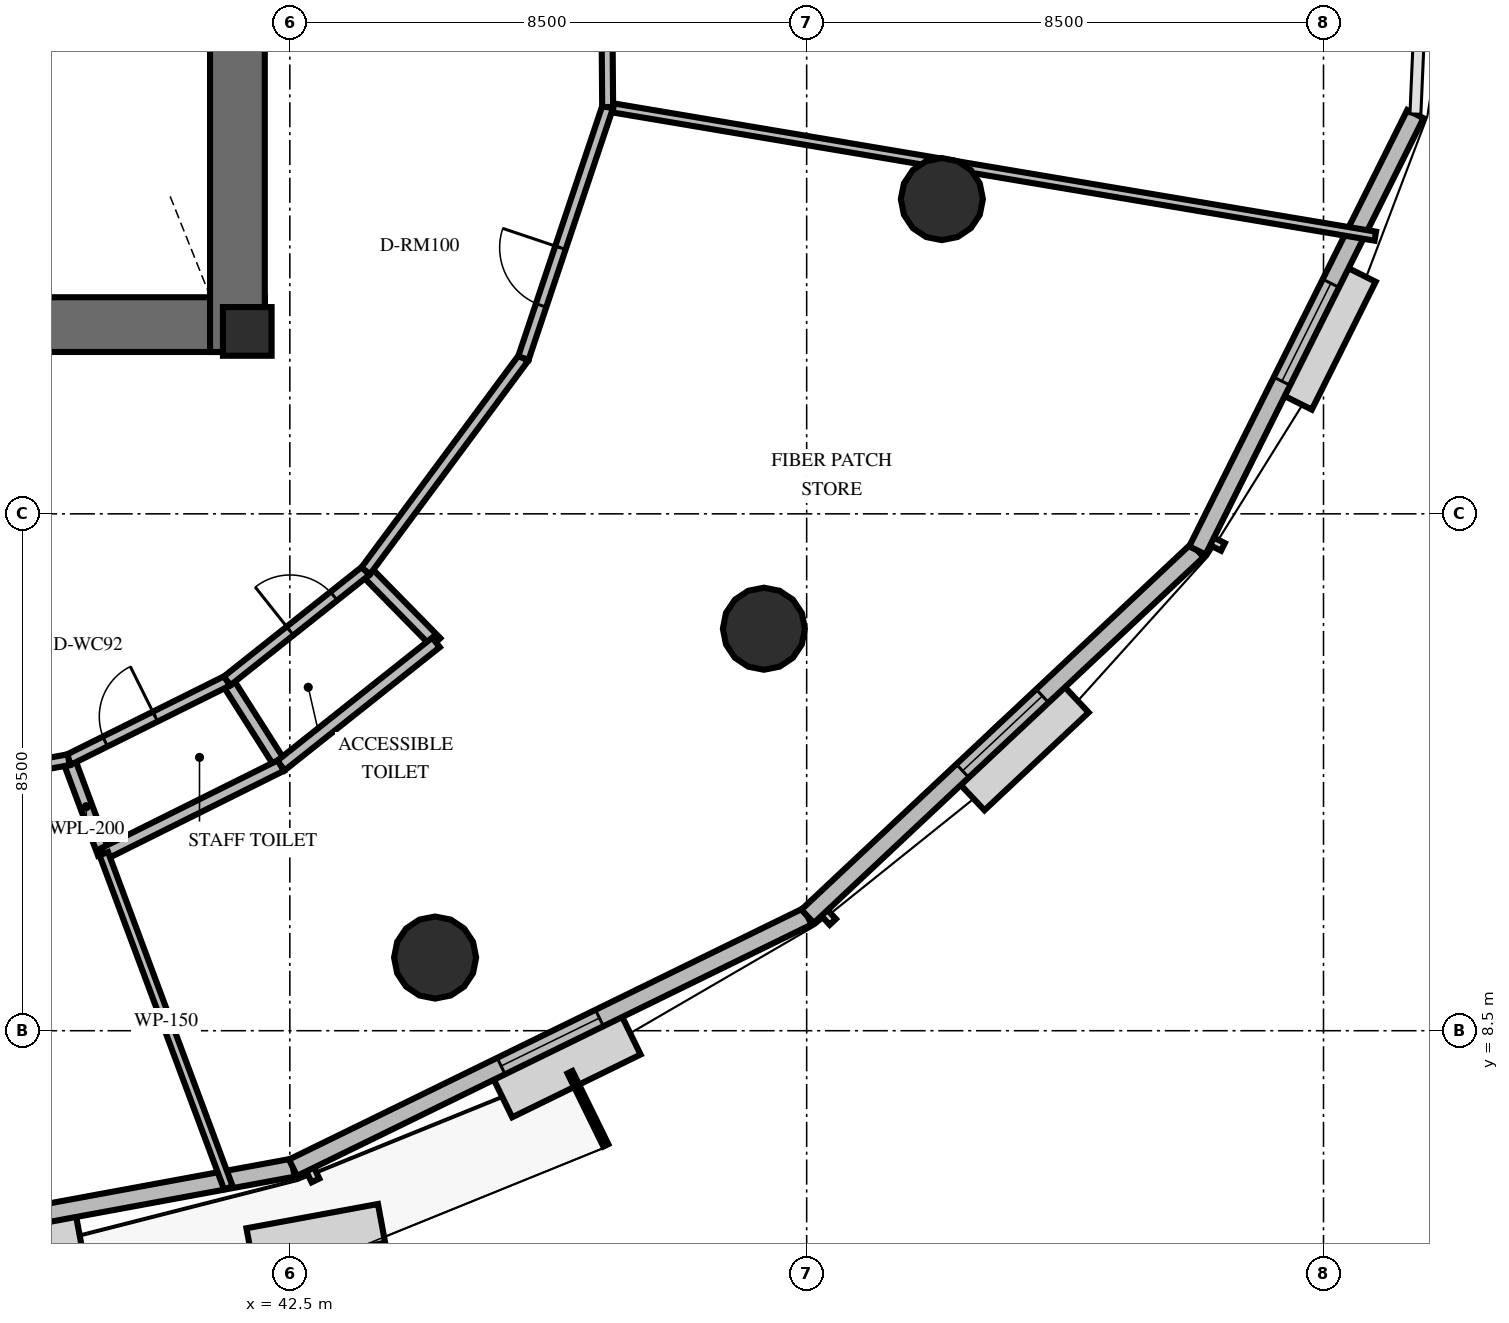
"""IFC4 building model, lengths in metres.
Left out: names, types, materials, properties, quantities, classifications, styles, units other than length and angle.
Written with IfcOpenShell. Run it as: python <this file> out.ifc"""

import sys

from ifc_helpers import new_model, si_unit, direction, frame, frame_2d, origin, origin_2d, place, context, subcontext, project, spatial, rectangle, circle, extrude, element, fill, save


model = new_model("IFC4")
c1 = context("Model", 3, precision=1e-05, world=origin(), true_north=direction((0.0, 1.0)))
c2 = subcontext(c1, "Body", "Model", "MODEL_VIEW")
j1 = project(units=[si_unit("LENGTHUNIT", "METRE"), si_unit("PLANEANGLEUNIT", "RADIAN")], contexts=[c1])
p1 = place(None, origin())
s1 = spatial("IfcSite", under=j1, at=p1, CompositionType="ELEMENT")
p2 = place(p1, origin())
s2 = spatial("IfcBuilding", under=s1, at=p2, CompositionType="ELEMENT")
p3 = place(p2, frame((0.0, 0.0, 76.2)))
s3 = spatial("IfcBuildingStorey", under=s2, at=p3, CompositionType="ELEMENT", Elevation=76.2)
p4 = place(p3, frame((25.922, 20.112, 0.0), z_axis=(0.0, 0.0, 1.0), x_axis=(1.0, 0.0, 0.0)))
e1 = element("IfcWall", 1, at=p4, inside=s3, PredefinedType="SHEAR", context=c2, shape_type="SweptSolid", body=[
    extrude(rectangle(XDim=16.166, YDim=0.9, at=frame_2d((8.083, 0.0))), origin(), (0.0, 0.0, 1.0), 4.2),
])
p5 = place(p3, frame((41.638, 19.662, 0.0), z_axis=(0.0, 0.0, 1.0), x_axis=(0.0, 1.0, 0.0)))
e2 = element("IfcWall", 2, at=p5, inside=s3, PredefinedType="SHEAR", context=c2, shape_type="SweptSolid", body=[
    extrude(rectangle(XDim=10.876, YDim=0.9, at=frame_2d((5.438, 0.0))), origin(), (0.0, 0.0, 1.0), 4.2),
])
p6 = place(p3, frame((41.8, 20.0, 0.0), z_axis=(0.0, 0.0, 1.0), x_axis=(1.0, 0.0, 0.0)))
e3 = element("IfcColumn", 3, at=p6, inside=s3, PredefinedType="PILASTER", context=c2, shape_type="SweptSolid", body=[
    extrude(rectangle(XDim=0.8, YDim=0.8, at=origin_2d()), origin(), (0.0, 0.0, 1.0), 4.2),
])
for number, where, z_axis, x_axis in (
    (4, (44.889, 9.703, 0.0), (0.0, 0.0, 1.0), (1.0, 0.0, 0.0)),
    (5, (50.297, 15.111, 0.0), (0.0, 0.0, 1.0), (1.0, 0.0, 0.0)),
    (6, (53.223, 22.176, 0.0), (0.0, 0.0, 1.0), (1.0, 0.0, 0.0)),
):
    element("IfcColumn", number, at=place(p3, frame(where, z_axis=z_axis, x_axis=x_axis)), inside=s3, PredefinedType="COLUMN", context=c2, shape_type="SweptSolid", body=[
        extrude(circle(Radius=0.675, at=origin_2d()), origin(), (0.0, 0.0, 1.0), 4.2),
    ])
p7 = place(p3, frame((33.057, 4.496, 0.0), z_axis=(0.0, 0.0, 1.0), x_axis=(0.983412379237, 0.18138382608, 0.0)))
e7 = element("IfcWall", 7, at=p7, inside=s3, PredefinedType="SOLIDWALL", context=c2, shape_type="SweptSolid", body=[
    extrude(rectangle(XDim=9.655, YDim=0.3, at=frame_2d((4.827, 0.0))), origin(), (0.0, 0.0, 1.0), 3.0),
])
p8 = place(p7, frame((0.43, 0.0, 0.0)))
e8 = element("IfcOpeningElement", 8, at=p8, cuts=e7, PredefinedType="OPENING", context=c2, shape_type="SweptSolid", body=[
    extrude(rectangle(XDim=1.05, YDim=2.15, at=frame_2d((0.525, 1.075))), frame((0.0, 0.16, 0.0), z_axis=(0.0, -1.0, 0.0), x_axis=(1.0, 0.0, 0.0)), (0.0, 0.0, 1.0), 0.32),
])
p9 = place(p3, frame((42.552, 6.247, 0.0), z_axis=(0.0, 0.0, 1.0), x_axis=(0.898541129578, 0.438889323699, 0.0)))
e9 = element("IfcWall", 9, at=p9, inside=s3, PredefinedType="SOLIDWALL", context=c2, shape_type="SweptSolid", body=[
    extrude(rectangle(XDim=9.419, YDim=0.3, at=frame_2d((4.709, 0.0))), origin(), (0.0, 0.0, 1.0), 3.0),
])
p10 = place(p9, frame((3.809, 0.0, 0.8)))
e10 = element("IfcOpeningElement", 10, at=p10, cuts=e9, PredefinedType="OPENING", context=c2, shape_type="SweptSolid", body=[
    extrude(rectangle(XDim=1.8, YDim=1.95, at=frame_2d((0.9, 0.975))), frame((0.0, 0.16, 0.0), z_axis=(0.0, -1.0, 0.0), x_axis=(1.0, 0.0, 0.0)), (0.0, 0.0, 1.0), 0.32),
])
p11 = place(p3, frame((51.015, 10.381, 0.0), z_axis=(0.0, 0.0, 1.0), x_axis=(0.729132694963, 0.684372349775, 0.0)))
e11 = element("IfcWall", 11, at=p11, inside=s3, PredefinedType="SOLIDWALL", context=c2, shape_type="SweptSolid", body=[
    extrude(rectangle(XDim=8.792, YDim=0.3, at=frame_2d((4.396, 0.0))), origin(), (0.0, 0.0, 1.0), 3.0),
])
p12 = place(p11, frame((3.496, 0.0, 0.8)))
e12 = element("IfcOpeningElement", 12, at=p12, cuts=e11, PredefinedType="OPENING", context=c2, shape_type="SweptSolid", body=[
    extrude(rectangle(XDim=1.8, YDim=1.95, at=frame_2d((0.9, 0.975))), frame((0.0, 0.16, 0.0), z_axis=(0.0, -1.0, 0.0), x_axis=(1.0, 0.0, 0.0)), (0.0, 0.0, 1.0), 0.32),
])
p13 = place(p3, frame((57.426, 16.398, 0.0), z_axis=(0.0, 0.0, 1.0), x_axis=(0.44697009801, 0.894548898319, 0.0)))
e13 = element("IfcWall", 13, at=p13, inside=s3, PredefinedType="SOLIDWALL", context=c2, shape_type="SweptSolid", body=[
    extrude(rectangle(XDim=8.022, YDim=0.3, at=frame_2d((4.011, 0.0))), origin(), (0.0, 0.0, 1.0), 3.0),
])
p14 = place(p13, frame((3.111, 0.0, 0.8)))
e14 = element("IfcOpeningElement", 14, at=p14, cuts=e13, PredefinedType="OPENING", context=c2, shape_type="SweptSolid", body=[
    extrude(rectangle(XDim=1.8, YDim=1.95, at=frame_2d((0.9, 0.975))), frame((0.0, 0.16, 0.0), z_axis=(0.0, -1.0, 0.0), x_axis=(1.0, 0.0, 0.0)), (0.0, 0.0, 1.0), 0.32),
])
for number, where, z_axis, x_axis in (
    (15, (38.864, 12.957, 0.0), (0.0, 0.0, 1.0), (0.349, -0.937, 0.0)),
    (16, (41.469, 14.253, 0.0), (0.0, 0.0, 1.0), (0.537, -0.844, 0.0)),
):
    element("IfcWall", number, at=place(p3, frame(where, z_axis=z_axis, x_axis=x_axis)), inside=s3, PredefinedType="PLUMBINGWALL", context=c2, shape_type="SweptSolid", body=[
        extrude(rectangle(XDim=1.65, YDim=0.2, at=frame_2d((0.825, 0.0))), origin(), (0.0, 0.0, 1.0), 3.0),
    ])
p15 = place(p3, frame((39.44, 11.411, 0.0), z_axis=(0.0, 0.0, 1.0), x_axis=(0.895340385459, 0.445382525664, 0.0)))
e17 = element("IfcWall", 17, at=p15, inside=s3, PredefinedType="PLUMBINGWALL", context=c2, shape_type="SweptSolid", body=[
    extrude(rectangle(XDim=3.255, YDim=0.2, at=frame_2d((1.627, 0.0))), origin(), (0.0, 0.0, 1.0), 3.0),
])
p16 = place(p3, frame((38.864, 12.957, 0.0), z_axis=(0.0, 0.0, 1.0), x_axis=(0.895331425302, 0.445400537568, 0.0)))
e18 = element("IfcWall", 18, at=p16, inside=s3, PredefinedType="PARTITIONING", context=c2, shape_type="SweptSolid", body=[
    extrude(rectangle(XDim=2.91, YDim=0.18, at=frame_2d((1.455, 0.0))), origin(), (0.0, 0.0, 1.0), 3.0),
])
p17 = place(p16, frame((0.669, 0.0, 0.0)))
e19 = element("IfcOpeningElement", 19, at=p17, cuts=e18, PredefinedType="OPENING", context=c2, shape_type="SweptSolid", body=[
    extrude(rectangle(XDim=0.92, YDim=2.1, at=frame_2d((0.46, 1.05))), frame((0.0, 0.1, 0.0), z_axis=(0.0, -1.0, 0.0), x_axis=(1.0, 0.0, 0.0)), (0.0, 0.0, 1.0), 0.2),
])
p18 = place(p3, frame((43.748, 16.063, 0.0), z_axis=(0.0, 0.0, 1.0), x_axis=(0.700342092657, -0.713807364246, 0.0)))
e20 = element("IfcWall", 20, at=p18, inside=s3, PredefinedType="PLUMBINGWALL", context=c2, shape_type="SweptSolid", body=[
    extrude(rectangle(XDim=1.65, YDim=0.2, at=frame_2d((0.825, 0.0))), origin(), (0.0, 0.0, 1.0), 3.0),
])
p19 = place(p3, frame((42.354, 12.861, 0.0), z_axis=(0.0, 0.0, 1.0), x_axis=(0.78315381666, 0.621828030447, 0.0)))
e21 = element("IfcWall", 21, at=p19, inside=s3, PredefinedType="PLUMBINGWALL", context=c2, shape_type="SweptSolid", body=[
    extrude(rectangle(XDim=3.255, YDim=0.2, at=frame_2d((1.627, 0.0))), origin(), (0.0, 0.0, 1.0), 3.0),
])
p20 = place(p3, frame((41.469, 14.253, 0.0), z_axis=(0.0, 0.0, 1.0), x_axis=(0.783155307365, 0.621826152993, 0.0)))
e22 = element("IfcWall", 22, at=p20, inside=s3, PredefinedType="PARTITIONING", context=c2, shape_type="SweptSolid", body=[
    extrude(rectangle(XDim=2.91, YDim=0.18, at=frame_2d((1.455, 0.0))), origin(), (0.0, 0.0, 1.0), 3.0),
])
p21 = place(p20, frame((1.321, 0.0, 0.0)))
e23 = element("IfcOpeningElement", 23, at=p21, cuts=e22, PredefinedType="OPENING", context=c2, shape_type="SweptSolid", body=[
    extrude(rectangle(XDim=0.92, YDim=2.1, at=frame_2d((0.46, 1.05))), frame((0.0, 0.1, 0.0), z_axis=(0.0, -1.0, 0.0), x_axis=(1.0, 0.0, 0.0)), (0.0, 0.0, 1.0), 0.2),
])
p22 = place(p3, frame((39.44, 11.411, 0.0), z_axis=(0.0, 0.0, 1.0), x_axis=(0.349393600654, -0.936976046557, 0.0)))
e24 = element("IfcWall", 24, at=p22, inside=s3, PredefinedType="PARTITIONING", context=c2, shape_type="SweptSolid", body=[
    extrude(rectangle(XDim=5.864, YDim=0.15, at=frame_2d((2.932, 0.0))), origin(), (0.0, 0.0, 1.0), 3.0),
])
p23 = place(p3, frame((47.727, 23.691, 0.0), z_axis=(0.0, 0.0, 1.0), x_axis=(0.986140728359, -0.165911011907, 0.0)))
e25 = element("IfcWall", 25, at=p23, inside=s3, PredefinedType="PARTITIONING", context=c2, shape_type="SweptSolid", body=[
    extrude(rectangle(XDim=12.802, YDim=0.15, at=frame_2d((6.401, 0.0))), origin(), (0.0, 0.0, 1.0), 3.0),
])
p24 = place(p3, frame((43.748, 16.063, 0.0), z_axis=(0.0, 0.0, 1.0), x_axis=(0.595496979613, 0.803357546346, 0.0)))
e26 = element("IfcWall", 26, at=p24, inside=s3, PredefinedType="PARTITIONING", context=c2, shape_type="SweptSolid", body=[
    extrude(rectangle(XDim=4.355, YDim=0.18, at=frame_2d((2.178, 0.0))), origin(), (0.0, 0.0, 1.0), 3.0),
])
p25 = place(p3, frame((46.342, 19.562, 0.0), z_axis=(0.0, 0.0, 1.0), x_axis=(0.318127487837, 0.948047942608, 0.0)))
e27 = element("IfcWall", 27, at=p25, inside=s3, PredefinedType="PARTITIONING", context=c2, shape_type="SweptSolid", body=[
    extrude(rectangle(XDim=4.355, YDim=0.18, at=frame_2d((2.178, 0.0))), origin(), (0.0, 0.0, 1.0), 3.0),
])
p26 = place(p25, frame((0.914, 0.0, 0.0)))
e28 = element("IfcOpeningElement", 28, at=p26, cuts=e27, PredefinedType="OPENING", context=c2, shape_type="SweptSolid", body=[
    extrude(rectangle(XDim=1.0, YDim=2.15, at=frame_2d((0.5, 1.075))), frame((0.0, 0.1, 0.0), z_axis=(0.0, -1.0, 0.0), x_axis=(1.0, 0.0, 0.0)), (0.0, 0.0, 1.0), 0.2),
])
p27 = place(p3, frame((47.727, 23.691, 0.0), z_axis=(0.0, 0.0, 1.0), x_axis=(-0.007827647661, 0.999969363497, 0.0)))
e29 = element("IfcWall", 29, at=p27, inside=s3, PredefinedType="PARTITIONING", context=c2, shape_type="SweptSolid", body=[
    extrude(rectangle(XDim=4.834, YDim=0.18, at=frame_2d((2.417, 0.0))), origin(), (0.0, 0.0, 1.0), 3.0),
])
p28 = place(p27, frame((1.842, 0.0, 0.0)))
e30 = element("IfcOpeningElement", 30, at=p28, cuts=e29, PredefinedType="OPENING", context=c2, shape_type="SweptSolid", body=[
    extrude(rectangle(XDim=1.15, YDim=2.15, at=frame_2d((0.575, 1.075))), frame((0.0, 0.1, 0.0), z_axis=(0.0, -1.0, 0.0), x_axis=(1.0, 0.0, 0.0)), (0.0, 0.0, 1.0), 0.2),
])
p29 = place(p3, frame((34.109, 12.08, 0.0), z_axis=(0.0, 0.0, 1.0), x_axis=(0.983409356077, 0.181400216044, 0.0)))
e31 = element("IfcWall", 31, at=p29, inside=s3, PredefinedType="PARTITIONING", context=c2, shape_type="SweptSolid", body=[
    extrude(rectangle(XDim=4.834, YDim=0.18, at=frame_2d((2.417, 0.0))), origin(), (0.0, 0.0, 1.0), 3.0),
])
p30 = place(p10, origin())
e32 = element("IfcWindow", 32, at=p30, inside=s3, PartitioningType="SINGLE_PANEL", PredefinedType="WINDOW", context=c2, shape_type="SweptSolid", body=[
    extrude(rectangle(XDim=1.8, YDim=1.95, at=frame_2d((0.9, 0.975))), frame((0.0, 0.03, 0.0), z_axis=(0.0, -1.0, 0.0), x_axis=(1.0, 0.0, 0.0)), (0.0, 0.0, 1.0), 0.06),
])
fill(e10, e32)
p31 = place(p12, origin())
e33 = element("IfcWindow", 33, at=p31, inside=s3, PartitioningType="SINGLE_PANEL", PredefinedType="WINDOW", context=c2, shape_type="SweptSolid", body=[
    extrude(rectangle(XDim=1.8, YDim=1.95, at=frame_2d((0.9, 0.975))), frame((0.0, 0.03, 0.0), z_axis=(0.0, -1.0, 0.0), x_axis=(1.0, 0.0, 0.0)), (0.0, 0.0, 1.0), 0.06),
])
fill(e12, e33)
p32 = place(p14, origin())
e34 = element("IfcWindow", 34, at=p32, inside=s3, PartitioningType="SINGLE_PANEL", PredefinedType="WINDOW", context=c2, shape_type="SweptSolid", body=[
    extrude(rectangle(XDim=1.8, YDim=1.95, at=frame_2d((0.9, 0.975))), frame((0.0, 0.03, 0.0), z_axis=(0.0, -1.0, 0.0), x_axis=(1.0, 0.0, 0.0)), (0.0, 0.0, 1.0), 0.06),
])
fill(e14, e34)
p33 = place(p17, origin())
e35 = element("IfcDoor", 35, at=p33, inside=s3, OperationType="SINGLE_SWING_RIGHT", PredefinedType="DOOR", context=c2, shape_type="SweptSolid", body=[
    extrude(rectangle(XDim=0.92, YDim=2.1, at=frame_2d((0.46, 1.05))), frame((0.0, 0.025, 0.0), z_axis=(0.0, -1.0, 0.0), x_axis=(1.0, 0.0, 0.0)), (0.0, 0.0, 1.0), 0.05),
])
fill(e19, e35)
p34 = place(p21, origin())
e36 = element("IfcDoor", 36, at=p34, inside=s3, OperationType="SINGLE_SWING_LEFT", PredefinedType="DOOR", context=c2, shape_type="SweptSolid", body=[
    extrude(rectangle(XDim=0.92, YDim=2.1, at=frame_2d((0.46, 1.05))), frame((0.0, 0.025, 0.0), z_axis=(0.0, -1.0, 0.0), x_axis=(1.0, 0.0, 0.0)), (0.0, 0.0, 1.0), 0.05),
])
fill(e23, e36)
p35 = place(p26, origin())
e37 = element("IfcDoor", 37, at=p35, inside=s3, OperationType="SINGLE_SWING_RIGHT", PredefinedType="DOOR", context=c2, shape_type="SweptSolid", body=[
    extrude(rectangle(XDim=1.0, YDim=2.15, at=frame_2d((0.5, 1.075))), frame((0.0, 0.025, 0.0), z_axis=(0.0, -1.0, 0.0), x_axis=(1.0, 0.0, 0.0)), (0.0, 0.0, 1.0), 0.05),
])
fill(e28, e37)
save(model, sys.argv[1])
